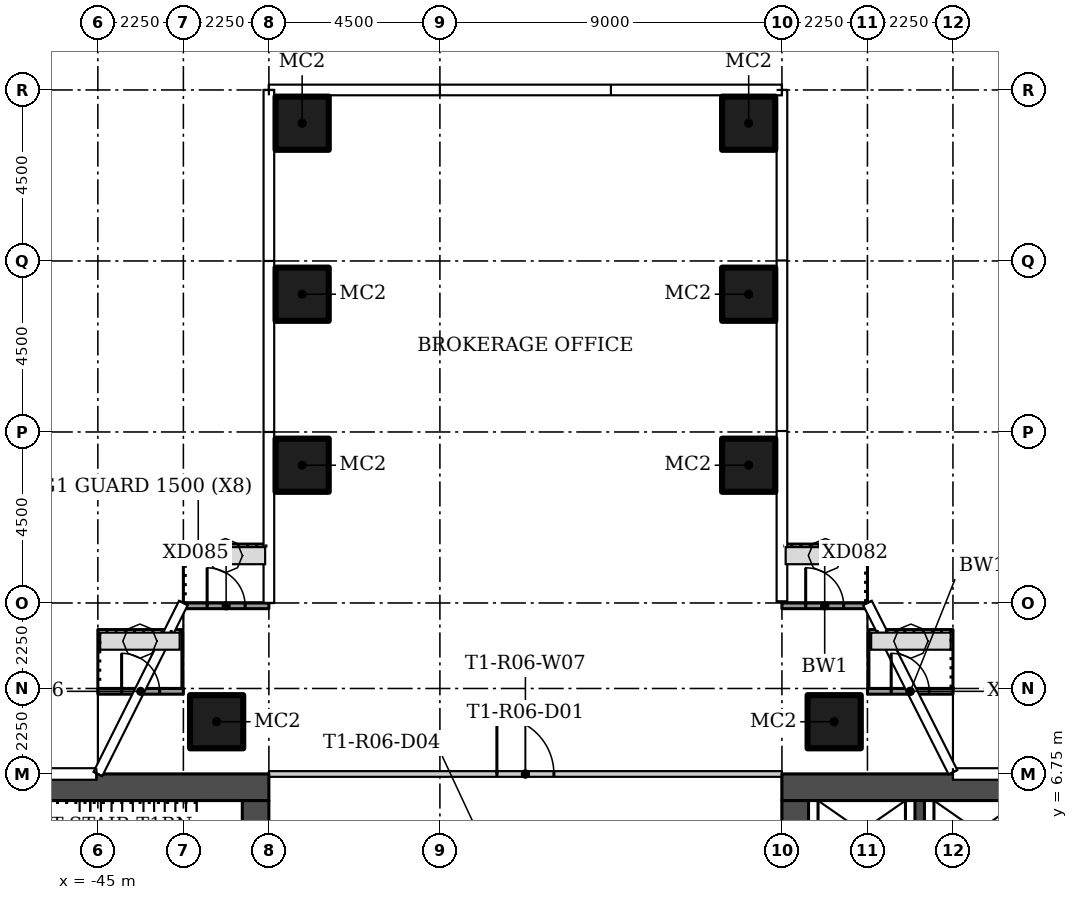
"""IFC4 building model, lengths in metres.
Left out: names, types, materials, properties, quantities, classifications, styles, units other than length and angle.
Written with IfcOpenShell. Run it as: python <this file> out.ifc"""

import sys

from ifc_helpers import new_model, si_unit, direction, frame, frame_2d, origin, origin_2d, place, context, subcontext, project, spatial, rectangle, hollow_rectangle, extrude, element, fill, save


model = new_model("IFC4")
c1 = context("Model", 3, precision=1e-05, world=origin(), true_north=direction((0.0, 1.0)))
c2 = subcontext(c1, "Body", "Model", "MODEL_VIEW")
j1 = project(units=[si_unit("LENGTHUNIT", "METRE"), si_unit("PLANEANGLEUNIT", "RADIAN")], contexts=[c1])
p1 = place(None, origin())
s1 = spatial("IfcSite", under=j1, at=p1, CompositionType="ELEMENT")
p2 = place(p1, origin())
s2 = spatial("IfcBuilding", under=s1, at=p2, CompositionType="ELEMENT")
p3 = place(p2, frame((0.0, 0.0, 65.4)))
s3 = spatial("IfcBuildingStorey", under=s2, at=p3, CompositionType="ELEMENT", Elevation=65.4)
for number, where in (
    (1, (-25.625, 8.125, 0.0)),
    (2, (-41.875, 8.125, 0.0)),
    (3, (-39.625, 14.875, 0.0)),
    (4, (-39.625, 19.375, 0.0)),
    (5, (-39.625, 23.875, 0.0)),
    (6, (-27.875, 14.875, 0.0)),
    (7, (-27.875, 19.375, 0.0)),
    (8, (-27.875, 23.875, 0.0)),
):
    element("IfcColumn", number, at=place(p3, frame(where)), inside=s3, PredefinedType="COLUMN", context=c2, shape_type="SweptSolid", body=[
        extrude(hollow_rectangle(XDim=1.4, YDim=1.4, WallThickness=0.05, at=origin_2d()), origin(), (0.0, 0.0, 1.0), 3.55),
    ])
p4 = place(p3, frame((-40.5, 6.75, 0.0)))
e9 = element("IfcWall", 9, at=p4, inside=s3, PredefinedType="PARTITIONING", context=c2, shape_type="SweptSolid", body=[
    extrude(rectangle(XDim=13.5, YDim=0.15, at=frame_2d((6.75, 0.0))), origin(), (0.0, 0.0, 1.0), 3.55),
])
p5 = place(p4, frame((6.0, 0.0, 0.0)))
e10 = element("IfcOpeningElement", 10, at=p5, cuts=e9, PredefinedType="OPENING", context=c2, shape_type="SweptSolid", body=[
    extrude(rectangle(XDim=1.5, YDim=2.1, at=frame_2d((0.75, 1.05))), frame((0.0, 0.085, 0.0), z_axis=(0.0, -1.0, 0.0), x_axis=(1.0, 0.0, 0.0)), (0.0, 0.0, 1.0), 0.17),
])
p6 = place(p3, frame((-24.75, 8.925, 0.0)))
e11 = element("IfcWall", 11, at=p6, inside=s3, PredefinedType="SOLIDWALL", context=c2, shape_type="SweptSolid", body=[
    extrude(rectangle(XDim=2.25, YDim=0.15, at=frame_2d((1.125, 0.0))), origin(), (0.0, 0.0, 1.0), 3.45),
])
p7 = place(p6, frame((0.625, 0.0, 0.0)))
e12 = element("IfcOpeningElement", 12, at=p7, cuts=e11, PredefinedType="OPENING", context=c2, shape_type="SweptSolid", body=[
    extrude(rectangle(XDim=1.0, YDim=2.4, at=frame_2d((0.5, 1.2))), frame((0.0, 0.085, 0.0), z_axis=(0.0, -1.0, 0.0), x_axis=(1.0, 0.0, 0.0)), (0.0, 0.0, 1.0), 0.17),
])
p8 = place(p3, frame((-27.0, 11.175, 0.0)))
e13 = element("IfcWall", 13, at=p8, inside=s3, PredefinedType="SOLIDWALL", context=c2, shape_type="SweptSolid", body=[
    extrude(rectangle(XDim=2.25, YDim=0.15, at=frame_2d((1.125, 0.0))), origin(), (0.0, 0.0, 1.0), 3.45),
])
p9 = place(p8, frame((0.625, 0.0, 0.0)))
e14 = element("IfcOpeningElement", 14, at=p9, cuts=e13, PredefinedType="OPENING", context=c2, shape_type="SweptSolid", body=[
    extrude(rectangle(XDim=1.0, YDim=2.4, at=frame_2d((0.5, 1.2))), frame((0.0, 0.085, 0.0), z_axis=(0.0, -1.0, 0.0), x_axis=(1.0, 0.0, 0.0)), (0.0, 0.0, 1.0), 0.17),
])
p10 = place(p3, frame((-42.75, 11.175, 0.0)))
e15 = element("IfcWall", 15, at=p10, inside=s3, PredefinedType="SOLIDWALL", context=c2, shape_type="SweptSolid", body=[
    extrude(rectangle(XDim=2.25, YDim=0.15, at=frame_2d((1.125, 0.0))), origin(), (0.0, 0.0, 1.0), 3.45),
])
p11 = place(p10, frame((0.625, 0.0, 0.0)))
e16 = element("IfcOpeningElement", 16, at=p11, cuts=e15, PredefinedType="OPENING", context=c2, shape_type="SweptSolid", body=[
    extrude(rectangle(XDim=1.0, YDim=2.4, at=frame_2d((0.5, 1.2))), frame((0.0, 0.085, 0.0), z_axis=(0.0, -1.0, 0.0), x_axis=(1.0, 0.0, 0.0)), (0.0, 0.0, 1.0), 0.17),
])
p12 = place(p3, frame((-45.0, 8.925, 0.0)))
e17 = element("IfcWall", 17, at=p12, inside=s3, PredefinedType="SOLIDWALL", context=c2, shape_type="SweptSolid", body=[
    extrude(rectangle(XDim=2.25, YDim=0.15, at=frame_2d((1.125, 0.0))), origin(), (0.0, 0.0, 1.0), 3.45),
])
p13 = place(p12, frame((0.625, 0.0, 0.0)))
e18 = element("IfcOpeningElement", 18, at=p13, cuts=e17, PredefinedType="OPENING", context=c2, shape_type="SweptSolid", body=[
    extrude(rectangle(XDim=1.0, YDim=2.4, at=frame_2d((0.5, 1.2))), frame((0.0, 0.085, 0.0), z_axis=(0.0, -1.0, 0.0), x_axis=(1.0, 0.0, 0.0)), (0.0, 0.0, 1.0), 0.17),
])
p14 = place(p3, frame((-27.0, 6.4, 0.0)))
e19 = element("IfcWall", 19, at=p14, inside=s3, PredefinedType="SHEAR", context=c2, shape_type="SweptSolid", body=[
    extrude(rectangle(XDim=13.5, YDim=0.7, at=frame_2d((6.75, 0.0))), origin(), (0.0, 0.0, 1.0), 3.55),
])
p15 = place(p3, frame((-26.65, 6.05, 0.0), z_axis=(0.0, 0.0, 1.0), x_axis=(0.0, -1.0, 0.0)))
e20 = element("IfcWall", 20, at=p15, inside=s3, PredefinedType="SHEAR", context=c2, shape_type="SweptSolid", body=[
    extrude(rectangle(XDim=12.1, YDim=0.7, at=frame_2d((6.05, 0.0))), origin(), (0.0, 0.0, 1.0), 3.55),
])
p16 = place(p15, frame((3.9, 0.0, 0.0)))
e21 = element("IfcOpeningElement", 21, at=p16, cuts=e20, PredefinedType="OPENING", context=c2, shape_type="SweptSolid", body=[
    extrude(rectangle(XDim=1.8, YDim=2.4, at=frame_2d((0.9, 1.2))), frame((0.0, 0.36, 0.0), z_axis=(0.0, -1.0, 0.0), x_axis=(1.0, 0.0, 0.0)), (0.0, 0.0, 1.0), 0.72),
])
p17 = place(p3, frame((-23.375, 3.25, 0.0), z_axis=(0.0, 0.0, 1.0), x_axis=(0.0, 1.0, 0.0)))
e22 = element("IfcWall", 22, at=p17, inside=s3, PredefinedType="SHEAR", context=c2, shape_type="SweptSolid", body=[
    extrude(rectangle(XDim=2.8, YDim=0.25, at=frame_2d((1.4, 0.0))), origin(), (0.0, 0.0, 1.0), 3.55),
])
p18 = place(p3, frame((-40.5, 6.4, 0.0), z_axis=(0.0, 0.0, 1.0), x_axis=(-1.0, 0.0, 0.0)))
e23 = element("IfcWall", 23, at=p18, inside=s3, PredefinedType="SHEAR", context=c2, shape_type="SweptSolid", body=[
    extrude(rectangle(XDim=13.5, YDim=0.7, at=frame_2d((6.75, 0.0))), origin(), (0.0, 0.0, 1.0), 3.55),
])
p19 = place(p3, frame((-40.85, -6.05, 0.0), z_axis=(0.0, 0.0, 1.0), x_axis=(0.0, 1.0, 0.0)))
e24 = element("IfcWall", 24, at=p19, inside=s3, PredefinedType="SHEAR", context=c2, shape_type="SweptSolid", body=[
    extrude(rectangle(XDim=12.1, YDim=0.7, at=frame_2d((6.05, 0.0))), origin(), (0.0, 0.0, 1.0), 3.55),
])
p20 = place(p19, frame((6.4, 0.0, 0.0)))
e25 = element("IfcOpeningElement", 25, at=p20, cuts=e24, PredefinedType="OPENING", context=c2, shape_type="SweptSolid", body=[
    extrude(rectangle(XDim=1.8, YDim=2.4, at=frame_2d((0.9, 1.2))), frame((0.0, 0.36, 0.0), z_axis=(0.0, -1.0, 0.0), x_axis=(1.0, 0.0, 0.0)), (0.0, 0.0, 1.0), 0.72),
])
p21 = place(p5, origin())
e26 = element("IfcDoor", 26, at=p21, inside=s3, OperationType="DOUBLE_DOOR_SINGLE_SWING", PredefinedType="DOOR", context=c2, shape_type="SweptSolid", body=[
    extrude(rectangle(XDim=1.5, YDim=2.1, at=frame_2d((0.75, 1.05))), frame((0.0, 0.025, 0.0), z_axis=(0.0, -1.0, 0.0), x_axis=(1.0, 0.0, 0.0)), (0.0, 0.0, 1.0), 0.05),
])
fill(e10, e26)
p22 = place(p7, origin())
e27 = element("IfcDoor", 27, at=p22, inside=s3, OperationType="SINGLE_SWING_RIGHT", PredefinedType="DOOR", context=c2, shape_type="SweptSolid", body=[
    extrude(rectangle(XDim=1.0, YDim=2.4, at=frame_2d((0.5, 1.2))), frame((0.0, 0.025, 0.0), z_axis=(0.0, -1.0, 0.0), x_axis=(1.0, 0.0, 0.0)), (0.0, 0.0, 1.0), 0.05),
])
fill(e12, e27)
p23 = place(p9, origin())
e28 = element("IfcDoor", 28, at=p23, inside=s3, OperationType="SINGLE_SWING_LEFT", PredefinedType="DOOR", context=c2, shape_type="SweptSolid", body=[
    extrude(rectangle(XDim=1.0, YDim=2.4, at=frame_2d((0.5, 1.2))), frame((0.0, 0.025, 0.0), z_axis=(0.0, -1.0, 0.0), x_axis=(1.0, 0.0, 0.0)), (0.0, 0.0, 1.0), 0.05),
])
fill(e14, e28)
p24 = place(p11, origin())
e29 = element("IfcDoor", 29, at=p24, inside=s3, OperationType="SINGLE_SWING_LEFT", PredefinedType="DOOR", context=c2, shape_type="SweptSolid", body=[
    extrude(rectangle(XDim=1.0, YDim=2.4, at=frame_2d((0.5, 1.2))), frame((0.0, 0.025, 0.0), z_axis=(0.0, -1.0, 0.0), x_axis=(1.0, 0.0, 0.0)), (0.0, 0.0, 1.0), 0.05),
])
fill(e16, e29)
p25 = place(p13, origin())
e30 = element("IfcDoor", 30, at=p25, inside=s3, OperationType="SINGLE_SWING_RIGHT", PredefinedType="DOOR", context=c2, shape_type="SweptSolid", body=[
    extrude(rectangle(XDim=1.0, YDim=2.4, at=frame_2d((0.5, 1.2))), frame((0.0, 0.025, 0.0), z_axis=(0.0, -1.0, 0.0), x_axis=(1.0, 0.0, 0.0)), (0.0, 0.0, 1.0), 0.05),
])
fill(e18, e30)
save(model, sys.argv[1])
